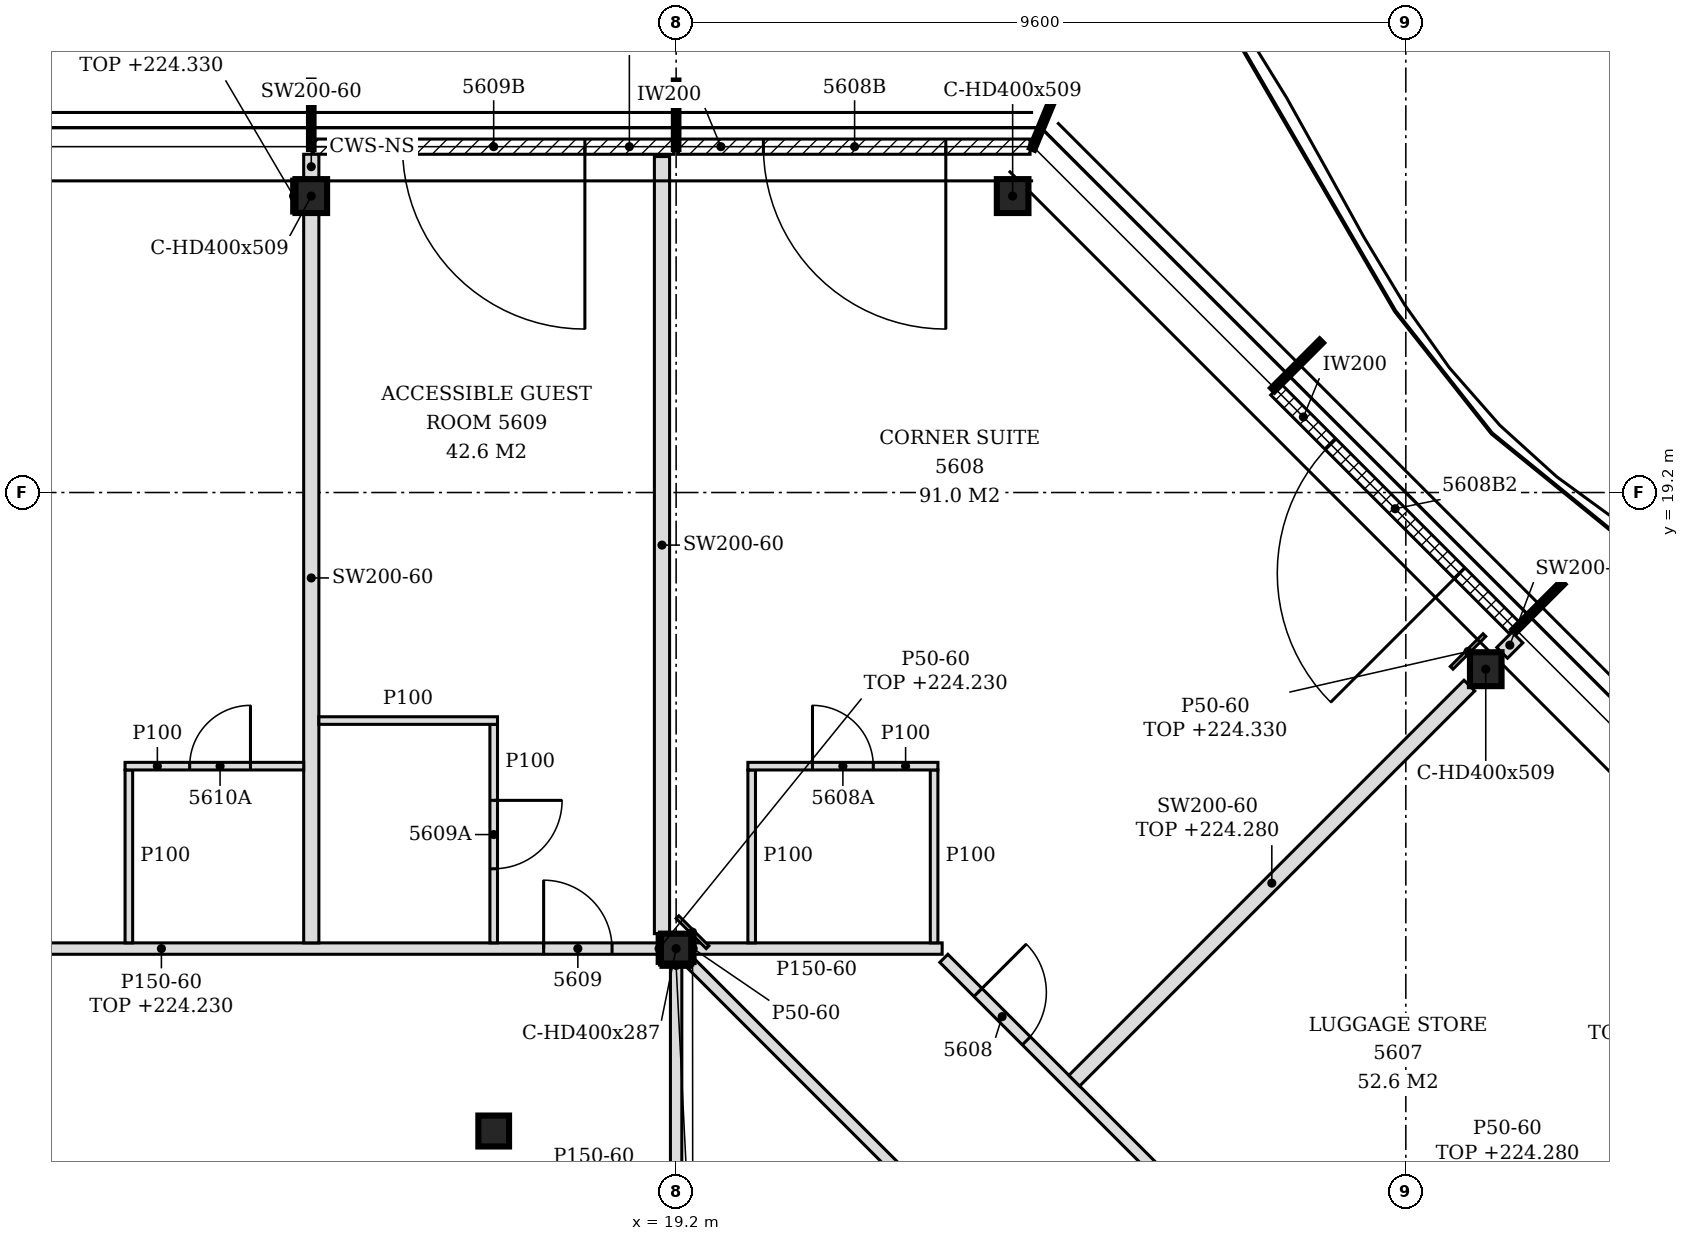
"""IFC4 building model, lengths in metres.
Left out: names, types, materials, properties, quantities, classifications, styles, units other than length and angle.
Written with IfcOpenShell. Run it as: python <this file> out.ifc"""

import sys

from ifc_helpers import new_model, si_unit, direction, frame, frame_2d, origin, origin_2d, place, context, subcontext, project, spatial, polyline, rectangle, i_section, outline, extrude, element, fill, save


model = new_model("IFC4")
c1 = context("Model", 3, precision=1e-05, world=origin(), true_north=direction((0.0, 1.0)))
c2 = subcontext(c1, "Body", "Model", "MODEL_VIEW")
j1 = project(units=[si_unit("LENGTHUNIT", "METRE"), si_unit("PLANEANGLEUNIT", "RADIAN")], contexts=[c1])
p1 = place(None, origin())
s1 = spatial("IfcSite", under=j1, at=p1, CompositionType="ELEMENT")
p2 = place(p1, origin())
s2 = spatial("IfcBuilding", under=s1, at=p2, CompositionType="ELEMENT")
p3 = place(p2, frame((0.0, 0.0, 221.4)))
s3 = spatial("IfcBuildingStorey", under=s2, at=p3, CompositionType="ELEMENT", Elevation=221.4)
for number, where, z_axis, x_axis in (
    (1, (29.852, 16.876, -0.15), (0.0, 0.0, 1.0), (1.0, 0.0, 0.0)),
    (2, (23.627, 23.1, -0.15), (0.0, 0.0, 1.0), (1.0, 0.0, 0.0)),
    (3, (14.4, 23.1, -0.15), (0.0, 0.0, 1.0), (1.0, 0.0, 0.0)),
):
    element("IfcColumn", number, at=place(p3, frame(where, z_axis=z_axis, x_axis=x_axis)), inside=s3, PredefinedType="COLUMN", context=c2, shape_type="SweptSolid", body=[
        extrude(i_section(OverallWidth=0.416, OverallDepth=0.446, WebThickness=0.039, FlangeThickness=0.063, FilletRadius=0.015, at=origin_2d()), origin(), (0.0, 0.0, 1.0), 3.6),
    ])
p4 = place(p3, frame((19.2, 13.2, -0.15), z_axis=(0.0, 0.0, 1.0), x_axis=(1.0, 0.0, 0.0)))
e4 = element("IfcColumn", 4, at=p4, inside=s3, PredefinedType="COLUMN", context=c2, shape_type="SweptSolid", body=[
    extrude(i_section(OverallWidth=0.399, OverallDepth=0.393, WebThickness=0.023, FlangeThickness=0.037, FilletRadius=0.015, at=origin_2d()), origin(), (0.0, 0.0, 1.0), 3.6),
])
p5 = place(p3, frame((16.8, 10.8, -0.15), z_axis=(0.0, 0.0, 1.0), x_axis=(1.0, 0.0, 0.0)))
e5 = element("IfcColumn", 5, at=p5, inside=s3, PredefinedType="COLUMN", context=c2, shape_type="SweptSolid", body=[
    extrude(i_section(OverallWidth=0.404, OverallDepth=0.407, WebThickness=0.027, FlangeThickness=0.044, FilletRadius=0.015, at=origin_2d()), origin(), (0.0, 0.0, 1.0), 3.6),
])
p6 = place(p3, frame((30.226, 17.42, 0.0), z_axis=(0.0, 0.0, 1.0), x_axis=(-0.707079231393, 0.707134329907, 0.0)))
e6 = element("IfcWall", 6, at=p6, inside=s3, PredefinedType="NOTDEFINED", context=c2, shape_type="SweptSolid", body=[
    extrude(rectangle(XDim=4.431, YDim=0.2, at=frame_2d((2.215, 0.0))), origin(), (0.0, 0.0, 1.0), 3.45),
])
p7 = place(p6, frame((1.015, 0.0, 0.0)))
e7 = element("IfcOpeningElement", 7, at=p7, cuts=e6, PredefinedType="OPENING", context=c2, shape_type="SweptSolid", body=[
    extrude(rectangle(XDim=2.4, YDim=2.4, at=frame_2d((1.2, 1.2))), frame((0.0, 0.11, 0.0), z_axis=(0.0, -1.0, 0.0), x_axis=(1.0, 0.0, 0.0)), (0.0, 0.0, 1.0), 0.22),
])
p8 = place(p3, frame((23.856, 23.75, 0.0), z_axis=(0.0, 0.0, 1.0), x_axis=(-1.0, 0.0, 0.0)))
e8 = element("IfcWall", 8, at=p8, inside=s3, PredefinedType="NOTDEFINED", context=c2, shape_type="SweptSolid", body=[
    extrude(rectangle(XDim=4.626, YDim=0.2, at=frame_2d((2.313, 0.0))), origin(), (0.0, 0.0, 1.0), 3.45),
])
p9 = place(p8, frame((1.108, 0.0, 0.0)))
e9 = element("IfcOpeningElement", 9, at=p9, cuts=e8, PredefinedType="OPENING", context=c2, shape_type="SweptSolid", body=[
    extrude(rectangle(XDim=2.4, YDim=2.4, at=frame_2d((1.2, 1.2))), frame((0.0, 0.11, 0.0), z_axis=(0.0, -1.0, 0.0), x_axis=(1.0, 0.0, 0.0)), (0.0, 0.0, 1.0), 0.22),
])
p10 = place(p3, frame((19.17, 23.75, 0.0), z_axis=(0.0, 0.0, 1.0), x_axis=(-1.0, 0.0, 0.0)))
e10 = element("IfcWall", 10, at=p10, inside=s3, PredefinedType="NOTDEFINED", context=c2, shape_type="SweptSolid", body=[
    extrude(rectangle(XDim=4.74, YDim=0.2, at=frame_2d((2.37, 0.0))), origin(), (0.0, 0.0, 1.0), 3.45),
])
p11 = place(p10, frame((1.17, 0.0, 0.0)))
e11 = element("IfcOpeningElement", 11, at=p11, cuts=e10, PredefinedType="OPENING", context=c2, shape_type="SweptSolid", body=[
    extrude(rectangle(XDim=2.4, YDim=2.4, at=frame_2d((1.2, 1.2))), frame((0.0, 0.11, 0.0), z_axis=(0.0, -1.0, 0.0), x_axis=(1.0, 0.0, 0.0)), (0.0, 0.0, 1.0), 0.22),
])
p12 = place(p3, frame((33.341, 2.453, 0.0), z_axis=(0.0, 0.0, 1.0), x_axis=(-0.707098652635, 0.707114909645, 0.0)))
e12 = element("IfcWall", 12, at=p12, inside=s3, PredefinedType="PARTITIONING", context=c2, shape_type="SweptSolid", body=[
    extrude(rectangle(XDim=15.018, YDim=0.15, at=frame_2d((7.509, 0.0))), origin(), (0.0, 0.0, 1.0), 2.88),
])
p13 = place(p12, frame((4.766, 0.0, 0.0)))
e13 = element("IfcOpeningElement", 13, at=p13, cuts=e12, PredefinedType="OPENING", context=c2, shape_type="SweptSolid", body=[
    extrude(rectangle(XDim=0.9, YDim=2.1, at=frame_2d((0.45, 1.05))), frame((0.0, 0.085, 0.0), z_axis=(0.0, -1.0, 0.0), x_axis=(1.0, 0.0, 0.0)), (0.0, 0.0, 1.0), 0.17),
])
p14 = place(p12, frame((9.167, 0.0, 0.0)))
e14 = element("IfcOpeningElement", 14, at=p14, cuts=e12, PredefinedType="OPENING", context=c2, shape_type="SweptSolid", body=[
    extrude(rectangle(XDim=0.9, YDim=2.1, at=frame_2d((0.45, 1.05))), frame((0.0, 0.085, 0.0), z_axis=(0.0, -1.0, 0.0), x_axis=(1.0, 0.0, 0.0)), (0.0, 0.0, 1.0), 0.17),
])
p15 = place(p12, frame((13.482, 0.0, 0.0)))
e15 = element("IfcOpeningElement", 15, at=p15, cuts=e12, PredefinedType="OPENING", context=c2, shape_type="SweptSolid", body=[
    extrude(rectangle(XDim=0.9, YDim=2.1, at=frame_2d((0.45, 1.05))), frame((0.0, 0.085, 0.0), z_axis=(0.0, -1.0, 0.0), x_axis=(1.0, 0.0, 0.0)), (0.0, 0.0, 1.0), 0.17),
])
p16 = place(p3, frame((19.2, 3.675, 0.0), z_axis=(0.0, 0.0, 1.0), x_axis=(0.0, 1.0, 0.0)))
e16 = element("IfcWall", 16, at=p16, inside=s3, PredefinedType="PARTITIONING", context=c2, shape_type="SweptSolid", body=[
    extrude(rectangle(XDim=9.328, YDim=0.15, at=frame_2d((4.664, 0.0))), origin(), (0.0, 0.0, 1.0), 2.83),
])
p17 = place(p16, frame((3.125, 0.0, 0.0)))
e17 = element("IfcOpeningElement", 17, at=p17, cuts=e16, PredefinedType="OPENING", context=c2, shape_type="SweptSolid", body=[
    extrude(rectangle(XDim=0.8, YDim=2.1, at=frame_2d((0.4, 1.05))), frame((0.0, 0.085, 0.0), z_axis=(0.0, -1.0, 0.0), x_axis=(1.0, 0.0, 0.0)), (0.0, 0.0, 1.0), 0.17),
])
p18 = place(p3, frame((28.672, 3.728, 0.0), z_axis=(0.0, 0.0, 1.0), x_axis=(-0.707116088468, 0.707097473782, 0.0)))
e18 = element("IfcWall", 18, at=p18, inside=s3, PredefinedType="PARTITIONING", context=c2, shape_type="SweptSolid", body=[
    extrude(rectangle(XDim=13.115, YDim=0.15, at=frame_2d((6.558, 0.0))), origin(), (0.0, 0.0, 1.0), 2.88),
])
p19 = place(p18, frame((6.157, 0.0, 0.0)))
e19 = element("IfcOpeningElement", 19, at=p19, cuts=e18, PredefinedType="OPENING", context=c2, shape_type="SweptSolid", body=[
    extrude(rectangle(XDim=0.9, YDim=2.1, at=frame_2d((0.45, 1.05))), frame((0.0, 0.085, 0.0), z_axis=(0.0, -1.0, 0.0), x_axis=(1.0, 0.0, 0.0)), (0.0, 0.0, 1.0), 0.17),
])
p20 = place(p3, frame((30.662, 5.238, 0.0), z_axis=(0.0, 0.0, 1.0), x_axis=(0.707106781187, 0.707106781187, 0.0)))
e20 = element("IfcWall", 20, at=p20, inside=s3, PredefinedType="PARTITIONING", context=c2, shape_type="SweptSolid", body=[
    extrude(rectangle(XDim=7.351, YDim=0.2, at=frame_2d((3.676, 0.0))), origin(), (0.0, 0.0, 1.0), 2.93),
])
p21 = place(p3, frame((31.398, 9.798, 0.0), z_axis=(0.0, 0.0, 1.0), x_axis=(0.707133900936, 0.707079660397, 0.0)))
e21 = element("IfcWall", 21, at=p21, inside=s3, PredefinedType="PARTITIONING", context=c2, shape_type="SweptSolid", body=[
    extrude(rectangle(XDim=4.501, YDim=0.2, at=frame_2d((2.25, 0.0))), origin(), (0.0, 0.0, 1.0), 2.63),
])
p22 = place(p3, frame((24.438, 11.462, 0.0), z_axis=(0.0, 0.0, 1.0), x_axis=(0.707090175614, 0.707123386369, 0.0)))
e22 = element("IfcWall", 22, at=p22, inside=s3, PredefinedType="PARTITIONING", context=c2, shape_type="SweptSolid", body=[
    extrude(rectangle(XDim=7.351, YDim=0.2, at=frame_2d((3.676, 0.0))), origin(), (0.0, 0.0, 1.0), 2.88),
])
p23 = place(p3, frame((7.399, 13.2, 0.0), z_axis=(0.0, 0.0, 1.0), x_axis=(1.0, 0.0, 0.0)))
e23 = element("IfcWall", 23, at=p23, inside=s3, PredefinedType="PARTITIONING", context=c2, shape_type="SweptSolid", body=[
    extrude(rectangle(XDim=11.601, YDim=0.15, at=frame_2d((5.801, 0.0))), origin(), (0.0, 0.0, 1.0), 2.83),
])
p24 = place(p23, frame((10.058, 0.0, 0.0)))
e24 = element("IfcOpeningElement", 24, at=p24, cuts=e23, PredefinedType="OPENING", context=c2, shape_type="SweptSolid", body=[
    extrude(rectangle(XDim=0.9, YDim=2.1, at=frame_2d((0.45, 1.05))), frame((0.0, 0.085, 0.0), z_axis=(0.0, -1.0, 0.0), x_axis=(1.0, 0.0, 0.0)), (0.0, 0.0, 1.0), 0.17),
])
p25 = place(p3, frame((19.399, 13.2, 0.0), z_axis=(0.0, 0.0, 1.0), x_axis=(1.0, 0.0, 0.0)))
e25 = element("IfcWall", 25, at=p25, inside=s3, PredefinedType="PARTITIONING", context=c2, shape_type="SweptSolid", body=[
    extrude(rectangle(XDim=3.301, YDim=0.15, at=frame_2d((1.65, 0.0))), origin(), (0.0, 0.0, 1.0), 3.45),
])
p26 = place(p3, frame((12.0, 13.275, 0.0), z_axis=(0.0, 0.0, 1.0), x_axis=(0.0, 1.0, 0.0)))
e26 = element("IfcWall", 26, at=p26, inside=s3, PredefinedType="PARTITIONING", context=c2, shape_type="SweptSolid", body=[
    extrude(outline(polyline([(0.0, 0.0), (2.275, 0.0), (2.275, 3.45), (0.075, 3.45), (0.073, 2.83), (0.0, 2.83), (0.0, 0.0)])), frame((0.0, 0.05, 0.0), z_axis=(0.0, -1.0, 0.0), x_axis=(1.0, 0.0, 0.0)), (0.0, 0.0, 1.0), 0.1),
])
p27 = place(p3, frame((14.4, 13.275, 0.0), z_axis=(0.0, 0.0, 1.0), x_axis=(0.0, 1.0, 0.0)))
e27 = element("IfcWall", 27, at=p27, inside=s3, PredefinedType="PARTITIONING", context=c2, shape_type="SweptSolid", body=[
    extrude(outline(polyline([(0.0, 0.0), (9.602, 0.0), (9.602, 3.45), (6.03, 3.45), (6.028, 2.88), (5.82, 2.88), (5.818, 3.45), (0.075, 3.45), (0.073, 2.83), (0.0, 2.83), (0.0, 0.0)])), frame((0.0, 0.1, 0.0), z_axis=(0.0, -1.0, 0.0), x_axis=(1.0, 0.0, 0.0)), (0.0, 0.0, 1.0), 0.2),
])
p28 = place(p3, frame((16.8, 13.275, 0.0), z_axis=(0.0, 0.0, 1.0), x_axis=(0.0, 1.0, 0.0)))
e28 = element("IfcWall", 28, at=p28, inside=s3, PredefinedType="PARTITIONING", context=c2, shape_type="SweptSolid", body=[
    extrude(outline(polyline([(0.0, 0.0), (2.875, 0.0), (2.875, 3.45), (0.075, 3.45), (0.073, 2.83), (0.0, 2.83), (0.0, 0.0)])), frame((0.0, 0.05, 0.0), z_axis=(0.0, -1.0, 0.0), x_axis=(1.0, 0.0, 0.0)), (0.0, 0.0, 1.0), 0.1),
])
p29 = place(p28, frame((0.975, 0.0, 0.0)))
e29 = element("IfcOpeningElement", 29, at=p29, cuts=e28, PredefinedType="OPENING", context=c2, shape_type="SweptSolid", body=[
    extrude(rectangle(XDim=0.9, YDim=2.1, at=frame_2d((0.45, 1.05))), frame((0.0, 0.06, 0.0), z_axis=(0.0, -1.0, 0.0), x_axis=(1.0, 0.0, 0.0)), (0.0, 0.0, 1.0), 0.12),
])
for number, where, z_axis, x_axis in (
    (30, (20.194, 13.275, 0.0), (0.0, 0.0, 1.0), (0.0, 1.0, 0.0)),
    (31, (22.594, 13.275, 0.0), (0.0, 0.0, 1.0), (0.0, 1.0, 0.0)),
):
    element("IfcWall", number, at=place(p3, frame(where, z_axis=z_axis, x_axis=x_axis)), inside=s3, PredefinedType="PARTITIONING", context=c2, shape_type="SweptSolid", body=[
        extrude(outline(polyline([(0.0, 0.0), (2.275, 0.0), (2.275, 3.45), (1.23, 3.45), (1.228, 2.88), (1.02, 2.88), (1.018, 3.45), (0.0, 3.45), (0.0, 0.0)])), frame((0.0, 0.05, 0.0), z_axis=(0.0, -1.0, 0.0), x_axis=(1.0, 0.0, 0.0)), (0.0, 0.0, 1.0), 0.1),
    ])
p30 = place(p3, frame((19.014, 13.396, 0.0), z_axis=(0.0, 0.0, 1.0), x_axis=(0.0, 1.0, 0.0)))
e32 = element("IfcWall", 32, at=p30, inside=s3, PredefinedType="PARTITIONING", context=c2, shape_type="SweptSolid", body=[
    extrude(outline(polyline([(0.0, 0.0), (10.224, 0.0), (10.223, 3.45), (9.854, 3.45), (9.852, 2.93), (5.908, 2.93), (5.906, 2.88), (5.698, 2.88), (5.697, 2.93), (0.003, 2.93), (0.001, 3.45), (0.0, 3.45), (0.0, 0.0)])), frame((0.0, 0.1, 0.0), z_axis=(0.0, -1.0, 0.0), x_axis=(1.0, 0.0, 0.0)), (0.0, 0.0, 1.0), 0.2),
])
p31 = place(p3, frame((11.95, 15.6, 0.0), z_axis=(0.0, 0.0, 1.0), x_axis=(1.0, 0.0, 0.0)))
e33 = element("IfcWall", 33, at=p31, inside=s3, PredefinedType="PARTITIONING", context=c2, shape_type="SweptSolid", body=[
    extrude(rectangle(XDim=2.35, YDim=0.1, at=frame_2d((1.175, 0.0))), origin(), (0.0, 0.0, 1.0), 3.45),
])
p32 = place(p31, frame((0.85, 0.0, 0.0)))
e34 = element("IfcOpeningElement", 34, at=p32, cuts=e33, PredefinedType="OPENING", context=c2, shape_type="SweptSolid", body=[
    extrude(rectangle(XDim=0.8, YDim=2.1, at=frame_2d((0.4, 1.05))), frame((0.0, 0.06, 0.0), z_axis=(0.0, -1.0, 0.0), x_axis=(1.0, 0.0, 0.0)), (0.0, 0.0, 1.0), 0.12),
])
p33 = place(p3, frame((20.144, 15.6, 0.0), z_axis=(0.0, 0.0, 1.0), x_axis=(1.0, 0.0, 0.0)))
e35 = element("IfcWall", 35, at=p33, inside=s3, PredefinedType="PARTITIONING", context=c2, shape_type="SweptSolid", body=[
    extrude(rectangle(XDim=2.5, YDim=0.1, at=frame_2d((1.25, 0.0))), origin(), (0.0, 0.0, 1.0), 3.45),
])
p34 = place(p33, frame((0.85, 0.0, 0.0)))
e36 = element("IfcOpeningElement", 36, at=p34, cuts=e35, PredefinedType="OPENING", context=c2, shape_type="SweptSolid", body=[
    extrude(rectangle(XDim=0.8, YDim=2.1, at=frame_2d((0.4, 1.05))), frame((0.0, 0.06, 0.0), z_axis=(0.0, -1.0, 0.0), x_axis=(1.0, 0.0, 0.0)), (0.0, 0.0, 1.0), 0.12),
])
p35 = place(p3, frame((14.5, 16.2, 0.0), z_axis=(0.0, 0.0, 1.0), x_axis=(1.0, 0.0, 0.0)))
e37 = element("IfcWall", 37, at=p35, inside=s3, PredefinedType="PARTITIONING", context=c2, shape_type="SweptSolid", body=[
    extrude(rectangle(XDim=2.35, YDim=0.1, at=frame_2d((1.175, 0.0))), origin(), (0.0, 0.0, 1.0), 3.45),
])
p36 = place(p3, frame((30.067, 17.091, 0.0), z_axis=(0.0, 0.0, 1.0), x_axis=(0.707106781187, 0.707106781187, 0.0)))
e38 = element("IfcWall", 38, at=p36, inside=s3, PredefinedType="PARTITIONING", context=c2, shape_type="SweptSolid", body=[
    extrude(rectangle(XDim=0.285, YDim=0.2, at=frame_2d((0.143, 0.0))), origin(), (0.0, 0.0, 1.0), 3.45),
])
p37 = place(p3, frame((14.4, 23.323, 0.0), z_axis=(0.0, 0.0, 1.0), x_axis=(0.0, 1.0, 0.0)))
e39 = element("IfcWall", 39, at=p37, inside=s3, PredefinedType="PARTITIONING", context=c2, shape_type="SweptSolid", body=[
    extrude(rectangle(XDim=0.327, YDim=0.2, at=frame_2d((0.164, 0.0))), origin(), (0.0, 0.0, 1.0), 3.45),
])
p38 = place(p3, frame((18.976, 13.003, 0.0), z_axis=(0.0, 0.0, 1.0), x_axis=(0.0, 1.0, 0.0)))
e40 = element("IfcWall", 40, at=p38, inside=s3, PredefinedType="PARTITIONING", context=c2, shape_type="SweptSolid", body=[
    extrude(rectangle(XDim=0.393, YDim=0.05, at=frame_2d((0.197, 0.0))), origin(), (0.0, 0.0, 1.0), 2.83),
])
p39 = place(p3, frame((19.614, 13.218, 0.0), z_axis=(0.0, 0.0, 1.0), x_axis=(-0.707106781187, 0.707106781187, 0.0)))
e41 = element("IfcWall", 41, at=p39, inside=s3, PredefinedType="PARTITIONING", context=c2, shape_type="SweptSolid", body=[
    extrude(rectangle(XDim=0.56, YDim=0.05, at=frame_2d((0.28, 0.0))), origin(), (0.0, 0.0, 1.0), 2.93),
])
p40 = place(p3, frame((29.403, 16.893, 0.0), z_axis=(0.0, 0.0, 1.0), x_axis=(0.706906496032, 0.707307009627, 0.0)))
e42 = element("IfcWall", 42, at=p40, inside=s3, PredefinedType="PARTITIONING", context=c2, shape_type="SweptSolid", body=[
    extrude(rectangle(XDim=0.61, YDim=0.05, at=frame_2d((0.305, 0.0))), origin(), (0.0, 0.0, 1.0), 2.93),
])
p41 = place(p3, frame((19.0, 12.979, 0.0), z_axis=(0.0, 0.0, 1.0), x_axis=(1.0, 0.0, 0.0)))
e43 = element("IfcWall", 43, at=p41, inside=s3, PredefinedType="PARTITIONING", context=c2, shape_type="SweptSolid", body=[
    extrude(rectangle(XDim=0.399, YDim=0.05, at=frame_2d((0.199, 0.0))), origin(), (0.0, 0.0, 1.0), 2.83),
])
p42 = place(p3, frame((14.167, 22.877, 0.0), z_axis=(0.0, 0.0, 1.0), x_axis=(0.0, 1.0, 0.0)))
e44 = element("IfcWall", 44, at=p42, inside=s3, PredefinedType="PARTITIONING", context=c2, shape_type="SweptSolid", body=[
    extrude(rectangle(XDim=0.446, YDim=0.05, at=frame_2d((0.223, 0.0))), origin(), (0.0, 0.0, 1.0), 2.93),
])
p43 = place(p3, frame((19.425, 13.003, 0.0), z_axis=(0.0, 0.0, 1.0), x_axis=(0.0, 1.0, 0.0)))
e45 = element("IfcWall", 45, at=p43, inside=s3, PredefinedType="PARTITIONING", context=c2, shape_type="SweptSolid", body=[
    extrude(rectangle(XDim=0.393, YDim=0.05, at=frame_2d((0.197, 0.0))), origin(), (0.0, 0.0, 1.0), 3.45),
])
p44 = place(p7, origin())
e46 = element("IfcDoor", 46, at=p44, inside=s3, OperationType="SINGLE_SWING_LEFT", PredefinedType="DOOR", context=c2, shape_type="SweptSolid", body=[
    extrude(rectangle(XDim=2.4, YDim=2.4, at=frame_2d((1.2, 1.2))), frame((0.0, 0.025, 0.0), z_axis=(0.0, -1.0, 0.0), x_axis=(1.0, 0.0, 0.0)), (0.0, 0.0, 1.0), 0.05),
])
fill(e7, e46)
p45 = place(p9, origin())
e47 = element("IfcDoor", 47, at=p45, inside=s3, OperationType="SINGLE_SWING_LEFT", PredefinedType="DOOR", context=c2, shape_type="SweptSolid", body=[
    extrude(rectangle(XDim=2.4, YDim=2.4, at=frame_2d((1.2, 1.2))), frame((0.0, 0.025, 0.0), z_axis=(0.0, -1.0, 0.0), x_axis=(1.0, 0.0, 0.0)), (0.0, 0.0, 1.0), 0.05),
])
fill(e9, e47)
p46 = place(p11, origin())
e48 = element("IfcDoor", 48, at=p46, inside=s3, OperationType="SINGLE_SWING_LEFT", PredefinedType="DOOR", context=c2, shape_type="SweptSolid", body=[
    extrude(rectangle(XDim=2.4, YDim=2.4, at=frame_2d((1.2, 1.2))), frame((0.0, 0.025, 0.0), z_axis=(0.0, -1.0, 0.0), x_axis=(1.0, 0.0, 0.0)), (0.0, 0.0, 1.0), 0.05),
])
fill(e11, e48)
p47 = place(p15, frame((0.9, 0.0, 0.0), z_axis=(0.0, 0.0, 1.0), x_axis=(-1.0, 0.0, 0.0)))
e49 = element("IfcDoor", 49, at=p47, inside=s3, OperationType="SINGLE_SWING_LEFT", PredefinedType="DOOR", context=c2, shape_type="SweptSolid", body=[
    extrude(rectangle(XDim=0.9, YDim=2.1, at=frame_2d((0.45, 1.05))), frame((0.0, 0.025, 0.0), z_axis=(0.0, -1.0, 0.0), x_axis=(1.0, 0.0, 0.0)), (0.0, 0.0, 1.0), 0.05),
])
fill(e15, e49)
p48 = place(p34, origin())
e50 = element("IfcDoor", 50, at=p48, inside=s3, OperationType="SINGLE_SWING_LEFT", PredefinedType="DOOR", context=c2, shape_type="SweptSolid", body=[
    extrude(rectangle(XDim=0.8, YDim=2.1, at=frame_2d((0.4, 1.05))), frame((0.0, 0.025, 0.0), z_axis=(0.0, -1.0, 0.0), x_axis=(1.0, 0.0, 0.0)), (0.0, 0.0, 1.0), 0.05),
])
fill(e36, e50)
p49 = place(p24, origin())
e51 = element("IfcDoor", 51, at=p49, inside=s3, OperationType="SINGLE_SWING_LEFT", PredefinedType="DOOR", context=c2, shape_type="SweptSolid", body=[
    extrude(rectangle(XDim=0.9, YDim=2.1, at=frame_2d((0.45, 1.05))), frame((0.0, 0.025, 0.0), z_axis=(0.0, -1.0, 0.0), x_axis=(1.0, 0.0, 0.0)), (0.0, 0.0, 1.0), 0.05),
])
fill(e24, e51)
p50 = place(p29, frame((0.9, 0.0, 0.0), z_axis=(0.0, 0.0, 1.0), x_axis=(-1.0, 0.0, 0.0)))
e52 = element("IfcDoor", 52, at=p50, inside=s3, OperationType="SINGLE_SWING_LEFT", PredefinedType="DOOR", context=c2, shape_type="SweptSolid", body=[
    extrude(rectangle(XDim=0.9, YDim=2.1, at=frame_2d((0.45, 1.05))), frame((0.0, 0.025, 0.0), z_axis=(0.0, -1.0, 0.0), x_axis=(1.0, 0.0, 0.0)), (0.0, 0.0, 1.0), 0.05),
])
fill(e29, e52)
p51 = place(p32, origin())
e53 = element("IfcDoor", 53, at=p51, inside=s3, OperationType="SINGLE_SWING_RIGHT", PredefinedType="DOOR", context=c2, shape_type="SweptSolid", body=[
    extrude(rectangle(XDim=0.8, YDim=2.1, at=frame_2d((0.4, 1.05))), frame((0.0, 0.025, 0.0), z_axis=(0.0, -1.0, 0.0), x_axis=(1.0, 0.0, 0.0)), (0.0, 0.0, 1.0), 0.05),
])
fill(e34, e53)
save(model, sys.argv[1])
